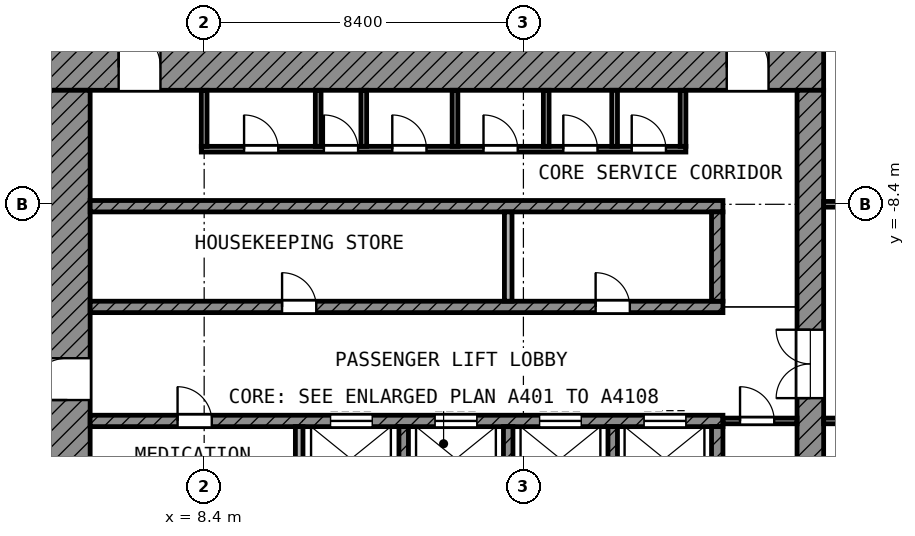
"""IFC4 building model, lengths in metres.
Left out: names, types, materials, properties, quantities, classifications, styles, units other than length and angle.
Written with IfcOpenShell. Run it as: python <this file> out.ifc"""

import sys

from ifc_helpers import new_model, si_unit, direction, frame, frame_2d, origin, place, context, subcontext, project, spatial, rectangle, extrude, element, fill, save


model = new_model("IFC4")
c1 = context("Model", 3, precision=1e-05, world=origin(), true_north=direction((0.0, 1.0)))
c2 = subcontext(c1, "Body", "Model", "MODEL_VIEW")
j1 = project(units=[si_unit("LENGTHUNIT", "METRE"), si_unit("PLANEANGLEUNIT", "RADIAN")], contexts=[c1])
p1 = place(None, origin())
s1 = spatial("IfcSite", under=j1, at=p1, CompositionType="ELEMENT")
p2 = place(p1, origin())
s2 = spatial("IfcBuilding", under=s1, at=p2, CompositionType="ELEMENT")
p3 = place(p2, frame((0.0, 0.0, 323.8)))
s3 = spatial("IfcBuildingStorey", under=s2, at=p3, CompositionType="ELEMENT", Elevation=323.8)
p4 = place(p3, frame((4.2, -4.8, 0.0), z_axis=(0.0, 0.0, 1.0), x_axis=(1.0, 0.0, 0.0)))
e1 = element("IfcWall", 1, at=p4, inside=s3, PredefinedType="SHEAR", context=c2, shape_type="SweptSolid", body=[
    extrude(rectangle(XDim=20.5, YDim=1.2, at=frame_2d((10.25, 0.0))), origin(), (0.0, 0.0, 1.0), 3.6),
])
p5 = place(p4, frame((1.95, 0.0, 0.0)))
e2 = element("IfcOpeningElement", 2, at=p5, cuts=e1, PredefinedType="OPENING", context=c2, shape_type="SweptSolid", body=[
    extrude(rectangle(XDim=1.1, YDim=2.1, at=frame_2d((0.55, 1.05))), frame((0.0, 0.61, 0.0), z_axis=(0.0, -1.0, 0.0), x_axis=(1.0, 0.0, 0.0)), (0.0, 0.0, 1.0), 1.22),
])
p6 = place(p4, frame((17.95, 0.0, 0.0)))
e3 = element("IfcOpeningElement", 3, at=p6, cuts=e1, PredefinedType="OPENING", context=c2, shape_type="SweptSolid", body=[
    extrude(rectangle(XDim=1.1, YDim=2.1, at=frame_2d((0.55, 1.05))), frame((0.0, 0.61, 0.0), z_axis=(0.0, -1.0, 0.0), x_axis=(1.0, 0.0, 0.0)), (0.0, 0.0, 1.0), 1.22),
])
p7 = place(p3, frame((4.8, -24.7, 0.0), z_axis=(0.0, 0.0, 1.0), x_axis=(0.0, 1.0, 0.0)))
e4 = element("IfcWall", 4, at=p7, inside=s3, PredefinedType="SHEAR", context=c2, shape_type="SweptSolid", body=[
    extrude(rectangle(XDim=19.3, YDim=1.2, at=frame_2d((9.65, 0.0))), origin(), (0.0, 0.0, 1.0), 3.6),
])
p8 = place(p7, frame((11.15, 0.0, 0.0)))
e5 = element("IfcOpeningElement", 5, at=p8, cuts=e4, PredefinedType="OPENING", context=c2, shape_type="SweptSolid", body=[
    extrude(rectangle(XDim=1.1, YDim=2.1, at=frame_2d((0.55, 1.05))), frame((0.0, 0.61, 0.0), z_axis=(0.0, -1.0, 0.0), x_axis=(1.0, 0.0, 0.0)), (0.0, 0.0, 1.0), 1.22),
])
p9 = place(p7, frame((1.85, 0.0, 0.0)))
e6 = element("IfcOpeningElement", 6, at=p9, cuts=e4, PredefinedType="OPENING", context=c2, shape_type="SweptSolid", body=[
    extrude(rectangle(XDim=1.1, YDim=2.1, at=frame_2d((0.55, 1.05))), frame((0.0, 0.61, 0.0), z_axis=(0.0, -1.0, 0.0), x_axis=(1.0, 0.0, 0.0)), (0.0, 0.0, 1.0), 1.22),
])
p10 = place(p3, frame((24.35, -24.0, 0.0), z_axis=(0.0, 0.0, 1.0), x_axis=(0.0, 1.0, 0.0)))
e7 = element("IfcWall", 7, at=p10, inside=s3, PredefinedType="SHEAR", context=c2, shape_type="SweptSolid", body=[
    extrude(rectangle(XDim=18.6, YDim=0.7, at=frame_2d((9.3, 0.0))), origin(), (0.0, 0.0, 1.0), 3.6),
])
p11 = place(p10, frame((10.5, 0.0, 0.0)))
e8 = element("IfcOpeningElement", 8, at=p11, cuts=e7, PredefinedType="OPENING", context=c2, shape_type="SweptSolid", body=[
    extrude(rectangle(XDim=1.8, YDim=2.1, at=frame_2d((0.9, 1.05))), frame((0.0, 0.36, 0.0), z_axis=(0.0, -1.0, 0.0), x_axis=(1.0, 0.0, 0.0)), (0.0, 0.0, 1.0), 0.72),
])
p12 = place(p3, frame((5.4, -8.45, 0.0), z_axis=(0.0, 0.0, 1.0), x_axis=(1.0, 0.0, 0.0)))
e9 = element("IfcWall", 9, at=p12, inside=s3, PredefinedType="SHEAR", context=c2, shape_type="SweptSolid", body=[
    extrude(rectangle(XDim=16.65, YDim=0.3, at=frame_2d((8.325, 0.0))), origin(), (0.0, 0.0, 1.0), 3.6),
])
p13 = place(p3, frame((5.4, -11.1, 0.0), z_axis=(0.0, 0.0, 1.0), x_axis=(1.0, 0.0, 0.0)))
e10 = element("IfcWall", 10, at=p13, inside=s3, PredefinedType="SHEAR", context=c2, shape_type="SweptSolid", body=[
    extrude(rectangle(XDim=16.65, YDim=0.3, at=frame_2d((8.325, 0.0))), origin(), (0.0, 0.0, 1.0), 3.6),
])
p14 = place(p13, frame((5.05, 0.0, 0.0)))
e11 = element("IfcOpeningElement", 11, at=p14, cuts=e10, PredefinedType="OPENING", context=c2, shape_type="SweptSolid", body=[
    extrude(rectangle(XDim=0.9, YDim=2.1, at=frame_2d((0.45, 1.05))), frame((0.0, 0.16, 0.0), z_axis=(0.0, -1.0, 0.0), x_axis=(1.0, 0.0, 0.0)), (0.0, 0.0, 1.0), 0.32),
])
p15 = place(p13, frame((13.3, 0.0, 0.0)))
e12 = element("IfcOpeningElement", 12, at=p15, cuts=e10, PredefinedType="OPENING", context=c2, shape_type="SweptSolid", body=[
    extrude(rectangle(XDim=0.9, YDim=2.1, at=frame_2d((0.45, 1.05))), frame((0.0, 0.16, 0.0), z_axis=(0.0, -1.0, 0.0), x_axis=(1.0, 0.0, 0.0)), (0.0, 0.0, 1.0), 0.32),
])
p16 = place(p3, frame((5.4, -14.1, 0.0), z_axis=(0.0, 0.0, 1.0), x_axis=(1.0, 0.0, 0.0)))
e13 = element("IfcWall", 13, at=p16, inside=s3, PredefinedType="SHEAR", context=c2, shape_type="SweptSolid", body=[
    extrude(rectangle(XDim=16.65, YDim=0.3, at=frame_2d((8.325, 0.0))), origin(), (0.0, 0.0, 1.0), 3.6),
])
p17 = place(p16, frame((6.325, 0.0, 0.0)))
e14 = element("IfcOpeningElement", 14, at=p17, cuts=e13, PredefinedType="OPENING", context=c2, shape_type="SweptSolid", body=[
    extrude(rectangle(XDim=1.1, YDim=2.1, at=frame_2d((0.55, 1.05))), frame((0.0, 0.16, 0.0), z_axis=(0.0, -1.0, 0.0), x_axis=(1.0, 0.0, 0.0)), (0.0, 0.0, 1.0), 0.32),
])
p18 = place(p16, frame((9.075, 0.0, 0.0)))
e15 = element("IfcOpeningElement", 15, at=p18, cuts=e13, PredefinedType="OPENING", context=c2, shape_type="SweptSolid", body=[
    extrude(rectangle(XDim=1.1, YDim=2.1, at=frame_2d((0.55, 1.05))), frame((0.0, 0.16, 0.0), z_axis=(0.0, -1.0, 0.0), x_axis=(1.0, 0.0, 0.0)), (0.0, 0.0, 1.0), 0.32),
])
p19 = place(p16, frame((11.825, 0.0, 0.0)))
e16 = element("IfcOpeningElement", 16, at=p19, cuts=e13, PredefinedType="OPENING", context=c2, shape_type="SweptSolid", body=[
    extrude(rectangle(XDim=1.1, YDim=2.1, at=frame_2d((0.55, 1.05))), frame((0.0, 0.16, 0.0), z_axis=(0.0, -1.0, 0.0), x_axis=(1.0, 0.0, 0.0)), (0.0, 0.0, 1.0), 0.32),
])
p20 = place(p16, frame((14.575, 0.0, 0.0)))
e17 = element("IfcOpeningElement", 17, at=p20, cuts=e13, PredefinedType="OPENING", context=c2, shape_type="SweptSolid", body=[
    extrude(rectangle(XDim=1.1, YDim=2.1, at=frame_2d((0.55, 1.05))), frame((0.0, 0.16, 0.0), z_axis=(0.0, -1.0, 0.0), x_axis=(1.0, 0.0, 0.0)), (0.0, 0.0, 1.0), 0.32),
])
p21 = place(p16, frame((2.3, 0.0, 0.0)))
e18 = element("IfcOpeningElement", 18, at=p21, cuts=e13, PredefinedType="OPENING", context=c2, shape_type="SweptSolid", body=[
    extrude(rectangle(XDim=0.9, YDim=2.1, at=frame_2d((0.45, 1.05))), frame((0.0, 0.16, 0.0), z_axis=(0.0, -1.0, 0.0), x_axis=(1.0, 0.0, 0.0)), (0.0, 0.0, 1.0), 0.32),
])
p22 = place(p3, frame((21.9, -10.95, 0.0), z_axis=(0.0, 0.0, 1.0), x_axis=(0.0, 1.0, 0.0)))
e19 = element("IfcWall", 19, at=p22, inside=s3, PredefinedType="SHEAR", context=c2, shape_type="SweptSolid", body=[
    extrude(rectangle(XDim=2.35, YDim=0.3, at=frame_2d((1.175, 0.0))), origin(), (0.0, 0.0, 1.0), 3.6),
])
p23 = place(p3, frame((21.9, -16.6, 0.0), z_axis=(0.0, 0.0, 1.0), x_axis=(0.0, 1.0, 0.0)))
e20 = element("IfcWall", 20, at=p23, inside=s3, PredefinedType="SHEAR", context=c2, shape_type="SweptSolid", body=[
    extrude(rectangle(XDim=2.35, YDim=0.3, at=frame_2d((1.175, 0.0))), origin(), (0.0, 0.0, 1.0), 3.6),
])
p24 = place(p3, frame((16.4, -10.95, 0.0), z_axis=(0.0, 0.0, 1.0), x_axis=(0.0, 1.0, 0.0)))
e21 = element("IfcWall", 21, at=p24, inside=s3, PredefinedType="PARTITIONING", context=c2, shape_type="SweptSolid", body=[
    extrude(rectangle(XDim=2.35, YDim=0.2, at=frame_2d((1.175, 0.0))), origin(), (0.0, 0.0, 1.0), 3.6),
])
p25 = place(p3, frame((10.9, -16.6, 0.0), z_axis=(0.0, 0.0, 1.0), x_axis=(0.0, 1.0, 0.0)))
e22 = element("IfcWall", 22, at=p25, inside=s3, PredefinedType="PARTITIONING", context=c2, shape_type="SweptSolid", body=[
    extrude(rectangle(XDim=2.35, YDim=0.2, at=frame_2d((1.175, 0.0))), origin(), (0.0, 0.0, 1.0), 3.6),
])
for number, where, z_axis, x_axis in (
    (23, (13.65, -16.6, 0.0), (0.0, 0.0, 1.0), (0.0, 1.0, 0.0)),
    (24, (16.4, -16.6, 0.0), (0.0, 0.0, 1.0), (0.0, 1.0, 0.0)),
    (25, (19.15, -16.6, 0.0), (0.0, 0.0, 1.0), (0.0, 1.0, 0.0)),
):
    element("IfcWall", number, at=place(p3, frame(where, z_axis=z_axis, x_axis=x_axis)), inside=s3, PredefinedType="SHEAR", context=c2, shape_type="SweptSolid", body=[
        extrude(rectangle(XDim=2.35, YDim=0.25, at=frame_2d((1.175, 0.0))), origin(), (0.0, 0.0, 1.0), 3.6),
    ])
p26 = place(p3, frame((22.05, -14.1, 0.0), z_axis=(0.0, 0.0, 1.0), x_axis=(1.0, 0.0, 0.0)))
e26 = element("IfcWall", 26, at=p26, inside=s3, PredefinedType="PARTITIONING", context=c2, shape_type="SweptSolid", body=[
    extrude(rectangle(XDim=1.95, YDim=0.15, at=frame_2d((0.975, 0.0))), origin(), (0.0, 0.0, 1.0), 3.6),
])
p27 = place(p26, frame((0.45, 0.0, 0.0)))
e27 = element("IfcOpeningElement", 27, at=p27, cuts=e26, PredefinedType="OPENING", context=c2, shape_type="SweptSolid", body=[
    extrude(rectangle(XDim=0.9, YDim=2.1, at=frame_2d((0.45, 1.05))), frame((0.0, 0.085, 0.0), z_axis=(0.0, -1.0, 0.0), x_axis=(1.0, 0.0, 0.0)), (0.0, 0.0, 1.0), 0.17),
])
p28 = place(p3, frame((8.325, -6.95, 0.0), z_axis=(0.0, 0.0, 1.0), x_axis=(1.0, 0.0, 0.0)))
e28 = element("IfcWall", 28, at=p28, inside=s3, PredefinedType="PARTITIONING", context=c2, shape_type="SweptSolid", body=[
    extrude(rectangle(XDim=12.75, YDim=0.15, at=frame_2d((6.375, 0.0))), origin(), (0.0, 0.0, 1.0), 3.6),
])
p29 = place(p28, frame((1.125, 0.0, 0.0)))
e29 = element("IfcOpeningElement", 29, at=p29, cuts=e28, PredefinedType="OPENING", context=c2, shape_type="SweptSolid", body=[
    extrude(rectangle(XDim=0.9, YDim=2.1, at=frame_2d((0.45, 1.05))), frame((0.0, 0.085, 0.0), z_axis=(0.0, -1.0, 0.0), x_axis=(1.0, 0.0, 0.0)), (0.0, 0.0, 1.0), 0.17),
])
p30 = place(p28, frame((3.225, 0.0, 0.0)))
e30 = element("IfcOpeningElement", 30, at=p30, cuts=e28, PredefinedType="OPENING", context=c2, shape_type="SweptSolid", body=[
    extrude(rectangle(XDim=0.9, YDim=2.1, at=frame_2d((0.45, 1.05))), frame((0.0, 0.085, 0.0), z_axis=(0.0, -1.0, 0.0), x_axis=(1.0, 0.0, 0.0)), (0.0, 0.0, 1.0), 0.17),
])
p31 = place(p28, frame((5.025, 0.0, 0.0)))
e31 = element("IfcOpeningElement", 31, at=p31, cuts=e28, PredefinedType="OPENING", context=c2, shape_type="SweptSolid", body=[
    extrude(rectangle(XDim=0.9, YDim=2.1, at=frame_2d((0.45, 1.05))), frame((0.0, 0.085, 0.0), z_axis=(0.0, -1.0, 0.0), x_axis=(1.0, 0.0, 0.0)), (0.0, 0.0, 1.0), 0.17),
])
p32 = place(p28, frame((7.425, 0.0, 0.0)))
e32 = element("IfcOpeningElement", 32, at=p32, cuts=e28, PredefinedType="OPENING", context=c2, shape_type="SweptSolid", body=[
    extrude(rectangle(XDim=0.9, YDim=2.1, at=frame_2d((0.45, 1.05))), frame((0.0, 0.085, 0.0), z_axis=(0.0, -1.0, 0.0), x_axis=(1.0, 0.0, 0.0)), (0.0, 0.0, 1.0), 0.17),
])
p33 = place(p28, frame((9.525, 0.0, 0.0)))
e33 = element("IfcOpeningElement", 33, at=p33, cuts=e28, PredefinedType="OPENING", context=c2, shape_type="SweptSolid", body=[
    extrude(rectangle(XDim=0.9, YDim=2.1, at=frame_2d((0.45, 1.05))), frame((0.0, 0.085, 0.0), z_axis=(0.0, -1.0, 0.0), x_axis=(1.0, 0.0, 0.0)), (0.0, 0.0, 1.0), 0.17),
])
p34 = place(p28, frame((11.325, 0.0, 0.0)))
e34 = element("IfcOpeningElement", 34, at=p34, cuts=e28, PredefinedType="OPENING", context=c2, shape_type="SweptSolid", body=[
    extrude(rectangle(XDim=0.9, YDim=2.1, at=frame_2d((0.45, 1.05))), frame((0.0, 0.085, 0.0), z_axis=(0.0, -1.0, 0.0), x_axis=(1.0, 0.0, 0.0)), (0.0, 0.0, 1.0), 0.17),
])
for number, where, z_axis, x_axis in (
    (35, (8.4, -6.875, 0.0), (0.0, 0.0, 1.0), (0.0, 1.0, 0.0)),
    (36, (11.4, -6.875, 0.0), (0.0, 0.0, 1.0), (0.0, 1.0, 0.0)),
    (37, (12.6, -6.875, 0.0), (0.0, 0.0, 1.0), (0.0, 1.0, 0.0)),
    (38, (15.0, -6.875, 0.0), (0.0, 0.0, 1.0), (0.0, 1.0, 0.0)),
    (39, (17.4, -6.875, 0.0), (0.0, 0.0, 1.0), (0.0, 1.0, 0.0)),
    (40, (19.2, -6.875, 0.0), (0.0, 0.0, 1.0), (0.0, 1.0, 0.0)),
    (41, (21.0, -6.875, 0.0), (0.0, 0.0, 1.0), (0.0, 1.0, 0.0)),
):
    element("IfcWall", number, at=place(p3, frame(where, z_axis=z_axis, x_axis=x_axis)), inside=s3, PredefinedType="PARTITIONING", context=c2, shape_type="SweptSolid", body=[
        extrude(rectangle(XDim=1.475, YDim=0.15, at=frame_2d((0.738, 0.0))), origin(), (0.0, 0.0, 1.0), 3.6),
    ])
p35 = place(p3, frame((24.7, -14.1, 0.0), z_axis=(0.0, 0.0, 1.0), x_axis=(1.0, 0.0, 0.0)))
e42 = element("IfcWall", 42, at=p35, inside=s3, PredefinedType="PARTITIONING", context=c2, shape_type="SweptSolid", body=[
    extrude(rectangle(XDim=4.625, YDim=0.15, at=frame_2d((2.312, 0.0))), origin(), (0.0, 0.0, 1.0), 3.6),
])
p36 = place(p35, frame((1.85, 0.0, 0.0)))
e43 = element("IfcOpeningElement", 43, at=p36, cuts=e42, PredefinedType="OPENING", context=c2, shape_type="SweptSolid", body=[
    extrude(rectangle(XDim=1.5, YDim=2.1, at=frame_2d((0.75, 1.05))), frame((0.0, 0.085, 0.0), z_axis=(0.0, -1.0, 0.0), x_axis=(1.0, 0.0, 0.0)), (0.0, 0.0, 1.0), 0.17),
])
p37 = place(p3, frame((24.7, -8.4, 0.0), z_axis=(0.0, 0.0, 1.0), x_axis=(1.0, 0.0, 0.0)))
e44 = element("IfcWall", 44, at=p37, inside=s3, PredefinedType="PARTITIONING", context=c2, shape_type="SweptSolid", body=[
    extrude(rectangle(XDim=15.582, YDim=0.15, at=frame_2d((7.791, 0.0))), origin(), (0.0, 0.0, 1.0), 3.6),
])
p38 = place(p37, frame((9.35, 0.0, 0.0)))
e45 = element("IfcOpeningElement", 45, at=p38, cuts=e44, PredefinedType="OPENING", context=c2, shape_type="SweptSolid", body=[
    extrude(rectangle(XDim=1.1, YDim=2.1, at=frame_2d((0.55, 1.05))), frame((0.0, 0.085, 0.0), z_axis=(0.0, -1.0, 0.0), x_axis=(1.0, 0.0, 0.0)), (0.0, 0.0, 1.0), 0.17),
])
p39 = place(p37, frame((1.05, 0.0, 0.0)))
e46 = element("IfcOpeningElement", 46, at=p39, cuts=e44, PredefinedType="OPENING", context=c2, shape_type="SweptSolid", body=[
    extrude(rectangle(XDim=1.0, YDim=2.1, at=frame_2d((0.5, 1.05))), frame((0.0, 0.085, 0.0), z_axis=(0.0, -1.0, 0.0), x_axis=(1.0, 0.0, 0.0)), (0.0, 0.0, 1.0), 0.17),
])
p40 = place(p37, frame((5.15, 0.0, 0.0)))
e47 = element("IfcOpeningElement", 47, at=p40, cuts=e44, PredefinedType="OPENING", context=c2, shape_type="SweptSolid", body=[
    extrude(rectangle(XDim=1.2, YDim=2.1, at=frame_2d((0.6, 1.05))), frame((0.0, 0.085, 0.0), z_axis=(0.0, -1.0, 0.0), x_axis=(1.0, 0.0, 0.0)), (0.0, 0.0, 1.0), 0.17),
])
p41 = place(p17, origin())
e48 = element("IfcDoor", 48, at=p41, inside=s3, OperationType="DOUBLE_DOOR_SLIDING", PredefinedType="DOOR", context=c2, shape_type="SweptSolid", body=[
    extrude(rectangle(XDim=1.1, YDim=2.1, at=frame_2d((0.55, 1.05))), frame((0.0, 0.025, 0.0), z_axis=(0.0, -1.0, 0.0), x_axis=(1.0, 0.0, 0.0)), (0.0, 0.0, 1.0), 0.05),
])
fill(e14, e48)
p42 = place(p18, origin())
e49 = element("IfcDoor", 49, at=p42, inside=s3, OperationType="DOUBLE_DOOR_SLIDING", PredefinedType="DOOR", context=c2, shape_type="SweptSolid", body=[
    extrude(rectangle(XDim=1.1, YDim=2.1, at=frame_2d((0.55, 1.05))), frame((0.0, 0.025, 0.0), z_axis=(0.0, -1.0, 0.0), x_axis=(1.0, 0.0, 0.0)), (0.0, 0.0, 1.0), 0.05),
])
fill(e15, e49)
p43 = place(p19, origin())
e50 = element("IfcDoor", 50, at=p43, inside=s3, OperationType="DOUBLE_DOOR_SLIDING", PredefinedType="DOOR", context=c2, shape_type="SweptSolid", body=[
    extrude(rectangle(XDim=1.1, YDim=2.1, at=frame_2d((0.55, 1.05))), frame((0.0, 0.025, 0.0), z_axis=(0.0, -1.0, 0.0), x_axis=(1.0, 0.0, 0.0)), (0.0, 0.0, 1.0), 0.05),
])
fill(e16, e50)
p44 = place(p20, origin())
e51 = element("IfcDoor", 51, at=p44, inside=s3, OperationType="DOUBLE_DOOR_SLIDING", PredefinedType="DOOR", context=c2, shape_type="SweptSolid", body=[
    extrude(rectangle(XDim=1.1, YDim=2.1, at=frame_2d((0.55, 1.05))), frame((0.0, 0.025, 0.0), z_axis=(0.0, -1.0, 0.0), x_axis=(1.0, 0.0, 0.0)), (0.0, 0.0, 1.0), 0.05),
])
fill(e17, e51)
p45 = place(p8, origin())
e52 = element("IfcDoor", 52, at=p45, inside=s3, OperationType="SINGLE_SWING_LEFT", PredefinedType="DOOR", context=c2, shape_type="SweptSolid", body=[
    extrude(rectangle(XDim=1.1, YDim=2.1, at=frame_2d((0.55, 1.05))), frame((0.0, 0.025, 0.0), z_axis=(0.0, -1.0, 0.0), x_axis=(1.0, 0.0, 0.0)), (0.0, 0.0, 1.0), 0.05),
])
fill(e5, e52)
p46 = place(p5, origin())
e53 = element("IfcDoor", 53, at=p46, inside=s3, OperationType="SINGLE_SWING_LEFT", PredefinedType="DOOR", context=c2, shape_type="SweptSolid", body=[
    extrude(rectangle(XDim=1.1, YDim=2.1, at=frame_2d((0.55, 1.05))), frame((0.0, 0.025, 0.0), z_axis=(0.0, -1.0, 0.0), x_axis=(1.0, 0.0, 0.0)), (0.0, 0.0, 1.0), 0.05),
])
fill(e2, e53)
p47 = place(p6, origin())
e54 = element("IfcDoor", 54, at=p47, inside=s3, OperationType="SINGLE_SWING_LEFT", PredefinedType="DOOR", context=c2, shape_type="SweptSolid", body=[
    extrude(rectangle(XDim=1.1, YDim=2.1, at=frame_2d((0.55, 1.05))), frame((0.0, 0.025, 0.0), z_axis=(0.0, -1.0, 0.0), x_axis=(1.0, 0.0, 0.0)), (0.0, 0.0, 1.0), 0.05),
])
fill(e3, e54)
p48 = place(p11, origin())
e55 = element("IfcDoor", 55, at=p48, inside=s3, OperationType="DOUBLE_DOOR_SINGLE_SWING", PredefinedType="DOOR", context=c2, shape_type="SweptSolid", body=[
    extrude(rectangle(XDim=1.8, YDim=2.1, at=frame_2d((0.9, 1.05))), frame((0.0, 0.025, 0.0), z_axis=(0.0, -1.0, 0.0), x_axis=(1.0, 0.0, 0.0)), (0.0, 0.0, 1.0), 0.05),
])
fill(e8, e55)
p49 = place(p29, origin())
e56 = element("IfcDoor", 56, at=p49, inside=s3, OperationType="SINGLE_SWING_LEFT", PredefinedType="DOOR", context=c2, shape_type="SweptSolid", body=[
    extrude(rectangle(XDim=0.9, YDim=2.1, at=frame_2d((0.45, 1.05))), frame((0.0, 0.025, 0.0), z_axis=(0.0, -1.0, 0.0), x_axis=(1.0, 0.0, 0.0)), (0.0, 0.0, 1.0), 0.05),
])
fill(e29, e56)
p50 = place(p30, origin())
e57 = element("IfcDoor", 57, at=p50, inside=s3, OperationType="SINGLE_SWING_LEFT", PredefinedType="DOOR", context=c2, shape_type="SweptSolid", body=[
    extrude(rectangle(XDim=0.9, YDim=2.1, at=frame_2d((0.45, 1.05))), frame((0.0, 0.025, 0.0), z_axis=(0.0, -1.0, 0.0), x_axis=(1.0, 0.0, 0.0)), (0.0, 0.0, 1.0), 0.05),
])
fill(e30, e57)
p51 = place(p31, origin())
e58 = element("IfcDoor", 58, at=p51, inside=s3, OperationType="SINGLE_SWING_LEFT", PredefinedType="DOOR", context=c2, shape_type="SweptSolid", body=[
    extrude(rectangle(XDim=0.9, YDim=2.1, at=frame_2d((0.45, 1.05))), frame((0.0, 0.025, 0.0), z_axis=(0.0, -1.0, 0.0), x_axis=(1.0, 0.0, 0.0)), (0.0, 0.0, 1.0), 0.05),
])
fill(e31, e58)
p52 = place(p32, origin())
e59 = element("IfcDoor", 59, at=p52, inside=s3, OperationType="SINGLE_SWING_LEFT", PredefinedType="DOOR", context=c2, shape_type="SweptSolid", body=[
    extrude(rectangle(XDim=0.9, YDim=2.1, at=frame_2d((0.45, 1.05))), frame((0.0, 0.025, 0.0), z_axis=(0.0, -1.0, 0.0), x_axis=(1.0, 0.0, 0.0)), (0.0, 0.0, 1.0), 0.05),
])
fill(e32, e59)
p53 = place(p33, origin())
e60 = element("IfcDoor", 60, at=p53, inside=s3, OperationType="SINGLE_SWING_LEFT", PredefinedType="DOOR", context=c2, shape_type="SweptSolid", body=[
    extrude(rectangle(XDim=0.9, YDim=2.1, at=frame_2d((0.45, 1.05))), frame((0.0, 0.025, 0.0), z_axis=(0.0, -1.0, 0.0), x_axis=(1.0, 0.0, 0.0)), (0.0, 0.0, 1.0), 0.05),
])
fill(e33, e60)
p54 = place(p34, origin())
e61 = element("IfcDoor", 61, at=p54, inside=s3, OperationType="SINGLE_SWING_LEFT", PredefinedType="DOOR", context=c2, shape_type="SweptSolid", body=[
    extrude(rectangle(XDim=0.9, YDim=2.1, at=frame_2d((0.45, 1.05))), frame((0.0, 0.025, 0.0), z_axis=(0.0, -1.0, 0.0), x_axis=(1.0, 0.0, 0.0)), (0.0, 0.0, 1.0), 0.05),
])
fill(e34, e61)
p55 = place(p27, origin())
e62 = element("IfcDoor", 62, at=p55, inside=s3, OperationType="SINGLE_SWING_LEFT", PredefinedType="DOOR", context=c2, shape_type="SweptSolid", body=[
    extrude(rectangle(XDim=0.9, YDim=2.1, at=frame_2d((0.45, 1.05))), frame((0.0, 0.025, 0.0), z_axis=(0.0, -1.0, 0.0), x_axis=(1.0, 0.0, 0.0)), (0.0, 0.0, 1.0), 0.05),
])
fill(e27, e62)
p56 = place(p14, origin())
e63 = element("IfcDoor", 63, at=p56, inside=s3, OperationType="SINGLE_SWING_LEFT", PredefinedType="DOOR", context=c2, shape_type="SweptSolid", body=[
    extrude(rectangle(XDim=0.9, YDim=2.1, at=frame_2d((0.45, 1.05))), frame((0.0, 0.025, 0.0), z_axis=(0.0, -1.0, 0.0), x_axis=(1.0, 0.0, 0.0)), (0.0, 0.0, 1.0), 0.05),
])
fill(e11, e63)
p57 = place(p15, origin())
e64 = element("IfcDoor", 64, at=p57, inside=s3, OperationType="SINGLE_SWING_LEFT", PredefinedType="DOOR", context=c2, shape_type="SweptSolid", body=[
    extrude(rectangle(XDim=0.9, YDim=2.1, at=frame_2d((0.45, 1.05))), frame((0.0, 0.025, 0.0), z_axis=(0.0, -1.0, 0.0), x_axis=(1.0, 0.0, 0.0)), (0.0, 0.0, 1.0), 0.05),
])
fill(e12, e64)
p58 = place(p21, origin())
e65 = element("IfcDoor", 65, at=p58, inside=s3, OperationType="SINGLE_SWING_LEFT", PredefinedType="DOOR", context=c2, shape_type="SweptSolid", body=[
    extrude(rectangle(XDim=0.9, YDim=2.1, at=frame_2d((0.45, 1.05))), frame((0.0, 0.025, 0.0), z_axis=(0.0, -1.0, 0.0), x_axis=(1.0, 0.0, 0.0)), (0.0, 0.0, 1.0), 0.05),
])
fill(e18, e65)
save(model, sys.argv[1])
